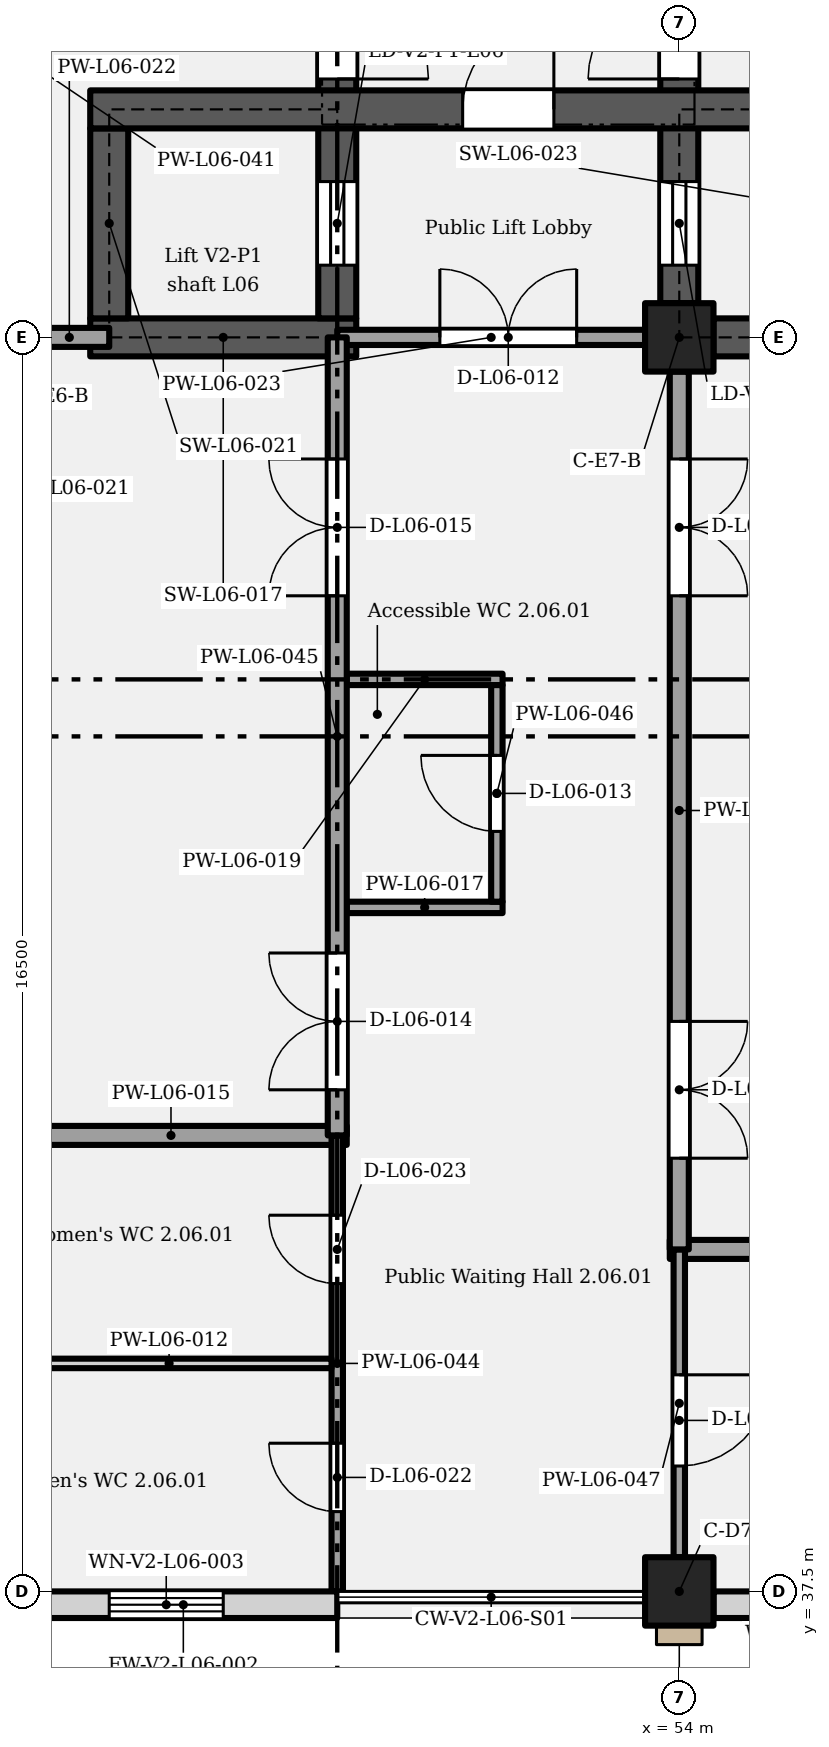
"""IFC4 building model, lengths in metres.
Left out: names, types, materials, properties, quantities, classifications, styles, units other than length and angle.
Written with IfcOpenShell. Run it as: python <this file> out.ifc"""

import sys

from ifc_helpers import new_model, si_unit, direction, frame, frame_2d, origin, origin_2d, place, context, subcontext, project, spatial, rectangle, extrude, element, fill, save


model = new_model("IFC4")
c1 = context("Model", 3, precision=1e-05, world=origin(), true_north=direction((0.0, 1.0)))
c2 = subcontext(c1, "Body", "Model", "MODEL_VIEW")
j1 = project(units=[si_unit("LENGTHUNIT", "METRE"), si_unit("PLANEANGLEUNIT", "RADIAN")], contexts=[c1])
p1 = place(None, origin())
s1 = spatial("IfcSite", under=j1, at=p1, CompositionType="ELEMENT")
p2 = place(p1, origin())
s2 = spatial("IfcBuilding", under=s1, at=p2, CompositionType="ELEMENT")
p3 = place(p2, frame((0.0, 0.0, 33.6)))
s3 = spatial("IfcBuildingStorey", under=s2, at=p3, CompositionType="ELEMENT", Elevation=33.6)
for number, where, z_axis, x_axis in (
    (1, (54.0, 37.5, 0.0), (0.0, 0.0, 1.0), (1.0, 0.0, 0.0)),
    (2, (54.0, 54.0, 0.0), (0.0, 0.0, 1.0), (1.0, 0.0, 0.0)),
):
    element("IfcColumn", number, at=place(p3, frame(where, z_axis=z_axis, x_axis=x_axis)), inside=s3, PredefinedType="COLUMN", context=c2, shape_type="SweptSolid", body=[
        extrude(rectangle(XDim=0.9, YDim=0.9, at=origin_2d()), origin(), (0.0, 0.0, 1.0), 5.4),
    ])
p4 = place(p3, frame((46.25, 54.0, 0.0), z_axis=(0.0, 0.0, 1.0), x_axis=(1.0, 0.0, 0.0)))
e3 = element("IfcWall", 3, at=p4, inside=s3, PredefinedType="SHEAR", context=c2, shape_type="SweptSolid", body=[
    extrude(rectangle(XDim=3.5, YDim=0.5, at=frame_2d((1.75, 0.0))), origin(), (0.0, 0.0, 1.0), 5.15),
])
p5 = place(p3, frame((54.45, 54.0, 0.0), z_axis=(0.0, 0.0, 1.0), x_axis=(1.0, 0.0, 0.0)))
e4 = element("IfcWall", 4, at=p5, inside=s3, PredefinedType="SHEAR", context=c2, shape_type="SweptSolid", body=[
    extrude(rectangle(XDim=2.8, YDim=0.5, at=frame_2d((1.4, 0.0))), origin(), (0.0, 0.0, 1.0), 5.15),
])
p6 = place(p3, frame((46.5, 54.25, 0.0), z_axis=(0.0, 0.0, 1.0), x_axis=(0.0, 1.0, 0.0)))
e5 = element("IfcWall", 5, at=p6, inside=s3, PredefinedType="SHEAR", context=c2, shape_type="SweptSolid", body=[
    extrude(rectangle(XDim=2.5, YDim=0.5, at=frame_2d((1.25, 0.0))), origin(), (0.0, 0.0, 1.0), 5.15),
])
p7 = place(p3, frame((49.5, 54.25, 0.0), z_axis=(0.0, 0.0, 1.0), x_axis=(0.0, 1.0, 0.0)))
e6 = element("IfcWall", 6, at=p7, inside=s3, PredefinedType="SHEAR", context=c2, shape_type="SweptSolid", body=[
    extrude(rectangle(XDim=11.5, YDim=0.5, at=frame_2d((5.75, 0.0))), origin(), (0.0, 0.0, 1.0), 5.15),
])
p8 = place(p7, frame((0.7, 0.0, 0.0)))
e7 = element("IfcOpeningElement", 7, at=p8, cuts=e6, PredefinedType="OPENING", context=c2, shape_type="SweptSolid", body=[
    extrude(rectangle(XDim=1.1, YDim=2.1, at=frame_2d((0.55, 1.05))), frame((0.0, 0.26, 0.0), z_axis=(0.0, -1.0, 0.0), x_axis=(1.0, 0.0, 0.0)), (0.0, 0.0, 1.0), 0.52),
])
p9 = place(p7, frame((4.35, 0.0, 0.0), z_axis=(0.0, 0.0, 1.0), x_axis=(-1.0, 0.0, 0.0)))
e8 = element("IfcOpeningElement", 8, at=p9, cuts=e6, PredefinedType="OPENING", context=c2, shape_type="SweptSolid", body=[
    extrude(rectangle(XDim=1.2, YDim=2.1, at=frame_2d((0.6, 1.05))), frame((0.0, 0.26, 0.0), z_axis=(0.0, -1.0, 0.0), x_axis=(1.0, 0.0, 0.0)), (0.0, 0.0, 1.0), 0.52),
])
p10 = place(p3, frame((54.0, 54.45, 0.0), z_axis=(0.0, 0.0, 1.0), x_axis=(0.0, 1.0, 0.0)))
e9 = element("IfcWall", 9, at=p10, inside=s3, PredefinedType="SHEAR", context=c2, shape_type="SweptSolid", body=[
    extrude(rectangle(XDim=11.1, YDim=0.5, at=frame_2d((5.55, 0.0))), origin(), (0.0, 0.0, 1.0), 5.15),
])
p11 = place(p10, frame((0.5, 0.0, 0.0)))
e10 = element("IfcOpeningElement", 10, at=p11, cuts=e9, PredefinedType="OPENING", context=c2, shape_type="SweptSolid", body=[
    extrude(rectangle(XDim=1.1, YDim=2.1, at=frame_2d((0.55, 1.05))), frame((0.0, 0.26, 0.0), z_axis=(0.0, -1.0, 0.0), x_axis=(1.0, 0.0, 0.0)), (0.0, 0.0, 1.0), 0.52),
])
p12 = place(p10, frame((2.95, 0.0, 0.0)))
e11 = element("IfcOpeningElement", 11, at=p12, cuts=e9, PredefinedType="OPENING", context=c2, shape_type="SweptSolid", body=[
    extrude(rectangle(XDim=1.2, YDim=2.1, at=frame_2d((0.6, 1.05))), frame((0.0, 0.26, 0.0), z_axis=(0.0, -1.0, 0.0), x_axis=(1.0, 0.0, 0.0)), (0.0, 0.0, 1.0), 0.52),
])
p13 = place(p3, frame((46.25, 57.0, 0.0), z_axis=(0.0, 0.0, 1.0), x_axis=(1.0, 0.0, 0.0)))
e12 = element("IfcWall", 12, at=p13, inside=s3, PredefinedType="SHEAR", context=c2, shape_type="SweptSolid", body=[
    extrude(rectangle(XDim=11.0, YDim=0.5, at=frame_2d((5.5, 0.0))), origin(), (0.0, 0.0, 1.0), 5.15),
])
p14 = place(p13, frame((4.9, 0.0, 0.0)))
e13 = element("IfcOpeningElement", 13, at=p14, cuts=e12, PredefinedType="OPENING", context=c2, shape_type="SweptSolid", body=[
    extrude(rectangle(XDim=1.2, YDim=2.1, at=frame_2d((0.6, 1.05))), frame((0.0, 0.26, 0.0), z_axis=(0.0, -1.0, 0.0), x_axis=(1.0, 0.0, 0.0)), (0.0, 0.0, 1.0), 0.52),
])
p15 = place(p3, frame((45.45, 37.325, 0.0), z_axis=(0.0, 0.0, 1.0), x_axis=(1.0, 0.0, 0.0)))
e14 = element("IfcWall", 14, at=p15, inside=s3, PredefinedType="SOLIDWALL", context=c2, shape_type="SweptSolid", body=[
    extrude(rectangle(XDim=4.05, YDim=0.35, at=frame_2d((2.025, 0.0))), origin(), (0.0, 0.0, 1.0), 5.15),
])
p16 = place(p15, frame((1.05, 0.0, 1.05)))
e15 = element("IfcOpeningElement", 15, at=p16, cuts=e14, PredefinedType="OPENING", context=c2, shape_type="SweptSolid", body=[
    extrude(rectangle(XDim=1.5, YDim=3.5, at=frame_2d((0.75, 1.75))), frame((0.0, 0.185, 0.0), z_axis=(0.0, -1.0, 0.0), x_axis=(1.0, 0.0, 0.0)), (0.0, 0.0, 1.0), 0.37),
])
p17 = place(p3, frame((54.45, 37.325, 0.0), z_axis=(0.0, 0.0, 1.0), x_axis=(1.0, 0.0, 0.0)))
e16 = element("IfcWall", 16, at=p17, inside=s3, PredefinedType="SOLIDWALL", context=c2, shape_type="SweptSolid", body=[
    extrude(rectangle(XDim=8.1, YDim=0.35, at=frame_2d((4.05, 0.0))), origin(), (0.0, 0.0, 1.0), 5.15),
])
p18 = place(p17, frame((0.525, 0.0, 1.05)))
e17 = element("IfcOpeningElement", 17, at=p18, cuts=e16, PredefinedType="OPENING", context=c2, shape_type="SweptSolid", body=[
    extrude(rectangle(XDim=1.05, YDim=2.4, at=frame_2d((0.525, 1.2))), frame((0.0, 0.185, 0.0), z_axis=(0.0, -1.0, 0.0), x_axis=(1.0, 0.0, 0.0)), (0.0, 0.0, 1.0), 0.37),
])
p19 = place(p17, frame((3.525, 0.0, 1.05)))
e18 = element("IfcOpeningElement", 18, at=p19, cuts=e16, PredefinedType="OPENING", context=c2, shape_type="SweptSolid", body=[
    extrude(rectangle(XDim=1.05, YDim=2.4, at=frame_2d((0.525, 1.2))), frame((0.0, 0.185, 0.0), z_axis=(0.0, -1.0, 0.0), x_axis=(1.0, 0.0, 0.0)), (0.0, 0.0, 1.0), 0.37),
])
p20 = place(p17, frame((6.525, 0.0, 1.05)))
e19 = element("IfcOpeningElement", 19, at=p20, cuts=e16, PredefinedType="OPENING", context=c2, shape_type="SweptSolid", body=[
    extrude(rectangle(XDim=1.05, YDim=2.4, at=frame_2d((0.525, 1.2))), frame((0.0, 0.185, 0.0), z_axis=(0.0, -1.0, 0.0), x_axis=(1.0, 0.0, 0.0)), (0.0, 0.0, 1.0), 0.37),
])
p21 = place(p3, frame((45.15, 40.5, 0.0), z_axis=(0.0, 0.0, 1.0), x_axis=(1.0, 0.0, 0.0)))
e20 = element("IfcWall", 20, at=p21, inside=s3, PredefinedType="PARTITIONING", context=c2, shape_type="SweptSolid", body=[
    extrude(rectangle(XDim=4.275, YDim=0.125, at=frame_2d((2.138, 0.0))), origin(), (0.0, 0.0, 1.0), 5.15),
])
p22 = place(p3, frame((53.875, 42.0, 0.0), z_axis=(0.0, 0.0, 1.0), x_axis=(1.0, 0.0, 0.0)))
e21 = element("IfcWall", 21, at=p22, inside=s3, PredefinedType="PARTITIONING", context=c2, shape_type="SweptSolid", body=[
    extrude(rectangle(XDim=9.125, YDim=0.25, at=frame_2d((4.562, 0.0))), origin(), (0.0, 0.0, 1.0), 5.15),
])
p23 = place(p3, frame((45.0, 43.5, 0.0), z_axis=(0.0, 0.0, 1.0), x_axis=(1.0, 0.0, 0.0)))
e22 = element("IfcWall", 22, at=p23, inside=s3, PredefinedType="PARTITIONING", context=c2, shape_type="SweptSolid", body=[
    extrude(rectangle(XDim=4.625, YDim=0.25, at=frame_2d((2.312, 0.0))), origin(), (0.0, 0.0, 1.0), 5.15),
])
for number, where, z_axis, x_axis in (
    (23, (49.625, 46.5, 0.0), (0.0, 0.0, 1.0), (1.0, 0.0, 0.0)),
    (24, (49.625, 49.5, 0.0), (0.0, 0.0, 1.0), (1.0, 0.0, 0.0)),
):
    element("IfcWall", number, at=place(p3, frame(where, z_axis=z_axis, x_axis=x_axis)), inside=s3, PredefinedType="PARTITIONING", context=c2, shape_type="SweptSolid", body=[
        extrude(rectangle(XDim=2.05, YDim=0.15, at=frame_2d((1.025, 0.0))), origin(), (0.0, 0.0, 1.0), 5.15),
    ])
p24 = place(p3, frame((45.45, 54.0, 0.0), z_axis=(0.0, 0.0, 1.0), x_axis=(1.0, 0.0, 0.0)))
e25 = element("IfcWall", 25, at=p24, inside=s3, PredefinedType="PARTITIONING", context=c2, shape_type="SweptSolid", body=[
    extrude(rectangle(XDim=1.05, YDim=0.25, at=frame_2d((0.525, 0.0))), origin(), (0.0, 0.0, 1.0), 4.4),
])
p25 = place(p3, frame((49.5, 54.0, 0.0), z_axis=(0.0, 0.0, 1.0), x_axis=(1.0, 0.0, 0.0)))
e26 = element("IfcWall", 26, at=p25, inside=s3, PredefinedType="PARTITIONING", context=c2, shape_type="SweptSolid", body=[
    extrude(rectangle(XDim=4.05, YDim=0.2, at=frame_2d((2.025, 0.0))), origin(), (0.0, 0.0, 1.0), 4.4),
])
p26 = place(p25, frame((1.35, 0.0, 0.0)))
e27 = element("IfcOpeningElement", 27, at=p26, cuts=e26, PredefinedType="OPENING", context=c2, shape_type="SweptSolid", body=[
    extrude(rectangle(XDim=1.8, YDim=2.1, at=frame_2d((0.9, 1.05))), frame((0.0, 0.11, 0.0), z_axis=(0.0, -1.0, 0.0), x_axis=(1.0, 0.0, 0.0)), (0.0, 0.0, 1.0), 0.22),
])
p27 = place(p3, frame((49.5, 37.5, 0.0), z_axis=(0.0, 0.0, 1.0), x_axis=(0.0, 1.0, 0.0)))
e28 = element("IfcWall", 28, at=p27, inside=s3, PredefinedType="PARTITIONING", context=c2, shape_type="SweptSolid", body=[
    extrude(rectangle(XDim=6.0, YDim=0.15, at=frame_2d((3.0, 0.0))), origin(), (0.0, 0.0, 1.0), 5.15),
])
p28 = place(p27, frame((1.05, 0.0, 0.0)))
e29 = element("IfcOpeningElement", 29, at=p28, cuts=e28, PredefinedType="OPENING", context=c2, shape_type="SweptSolid", body=[
    extrude(rectangle(XDim=0.9, YDim=2.1, at=frame_2d((0.45, 1.05))), frame((0.0, 0.085, 0.0), z_axis=(0.0, -1.0, 0.0), x_axis=(1.0, 0.0, 0.0)), (0.0, 0.0, 1.0), 0.17),
])
p29 = place(p27, frame((4.05, 0.0, 0.0)))
e30 = element("IfcOpeningElement", 30, at=p29, cuts=e28, PredefinedType="OPENING", context=c2, shape_type="SweptSolid", body=[
    extrude(rectangle(XDim=0.9, YDim=2.1, at=frame_2d((0.45, 1.05))), frame((0.0, 0.085, 0.0), z_axis=(0.0, -1.0, 0.0), x_axis=(1.0, 0.0, 0.0)), (0.0, 0.0, 1.0), 0.17),
])
p30 = place(p3, frame((49.5, 43.5, 0.0), z_axis=(0.0, 0.0, 1.0), x_axis=(0.0, 1.0, 0.0)))
e31 = element("IfcWall", 31, at=p30, inside=s3, PredefinedType="PARTITIONING", context=c2, shape_type="SweptSolid", body=[
    extrude(rectangle(XDim=10.5, YDim=0.25, at=frame_2d((5.25, 0.0))), origin(), (0.0, 0.0, 1.0), 5.15),
])
p31 = place(p30, frame((0.6, 0.0, 0.0)))
e32 = element("IfcOpeningElement", 32, at=p31, cuts=e31, PredefinedType="OPENING", context=c2, shape_type="SweptSolid", body=[
    extrude(rectangle(XDim=1.8, YDim=2.4, at=frame_2d((0.9, 1.2))), frame((0.0, 0.135, 0.0), z_axis=(0.0, -1.0, 0.0), x_axis=(1.0, 0.0, 0.0)), (0.0, 0.0, 1.0), 0.27),
])
p32 = place(p30, frame((7.1, 0.0, 0.0)))
e33 = element("IfcOpeningElement", 33, at=p32, cuts=e31, PredefinedType="OPENING", context=c2, shape_type="SweptSolid", body=[
    extrude(rectangle(XDim=1.8, YDim=2.4, at=frame_2d((0.9, 1.2))), frame((0.0, 0.135, 0.0), z_axis=(0.0, -1.0, 0.0), x_axis=(1.0, 0.0, 0.0)), (0.0, 0.0, 1.0), 0.27),
])
p33 = place(p3, frame((51.6, 46.575, 0.0), z_axis=(0.0, 0.0, 1.0), x_axis=(0.0, 1.0, 0.0)))
e34 = element("IfcWall", 34, at=p33, inside=s3, PredefinedType="PARTITIONING", context=c2, shape_type="SweptSolid", body=[
    extrude(rectangle(XDim=2.85, YDim=0.15, at=frame_2d((1.425, 0.0))), origin(), (0.0, 0.0, 1.0), 5.15),
])
p34 = place(p33, frame((0.925, 0.0, 0.0)))
e35 = element("IfcOpeningElement", 35, at=p34, cuts=e34, PredefinedType="OPENING", context=c2, shape_type="SweptSolid", body=[
    extrude(rectangle(XDim=1.0, YDim=2.1, at=frame_2d((0.5, 1.05))), frame((0.0, 0.085, 0.0), z_axis=(0.0, -1.0, 0.0), x_axis=(1.0, 0.0, 0.0)), (0.0, 0.0, 1.0), 0.17),
])
p35 = place(p3, frame((54.0, 37.95, 0.0), z_axis=(0.0, 0.0, 1.0), x_axis=(0.0, 1.0, 0.0)))
e36 = element("IfcWall", 36, at=p35, inside=s3, PredefinedType="PARTITIONING", context=c2, shape_type="SweptSolid", body=[
    extrude(rectangle(XDim=4.05, YDim=0.15, at=frame_2d((2.025, 0.0))), origin(), (0.0, 0.0, 1.0), 4.2),
])
p36 = place(p35, frame((2.4, 0.0, 0.0), z_axis=(0.0, 0.0, 1.0), x_axis=(-1.0, 0.0, 0.0)))
e37 = element("IfcOpeningElement", 37, at=p36, cuts=e36, PredefinedType="OPENING", context=c2, shape_type="SweptSolid", body=[
    extrude(rectangle(XDim=1.2, YDim=2.1, at=frame_2d((0.6, 1.05))), frame((0.0, 0.085, 0.0), z_axis=(0.0, -1.0, 0.0), x_axis=(1.0, 0.0, 0.0)), (0.0, 0.0, 1.0), 0.17),
])
p37 = place(p3, frame((54.0, 42.0, 0.0), z_axis=(0.0, 0.0, 1.0), x_axis=(0.0, 1.0, 0.0)))
e38 = element("IfcWall", 38, at=p37, inside=s3, PredefinedType="PARTITIONING", context=c2, shape_type="SweptSolid", body=[
    extrude(rectangle(XDim=11.55, YDim=0.25, at=frame_2d((5.775, 0.0))), origin(), (0.0, 0.0, 1.0), 4.2),
])
p38 = place(p37, frame((3.0, 0.0, 0.0), z_axis=(0.0, 0.0, 1.0), x_axis=(-1.0, 0.0, 0.0)))
e39 = element("IfcOpeningElement", 39, at=p38, cuts=e38, PredefinedType="OPENING", context=c2, shape_type="SweptSolid", body=[
    extrude(rectangle(XDim=1.8, YDim=2.4, at=frame_2d((0.9, 1.2))), frame((0.0, 0.135, 0.0), z_axis=(0.0, -1.0, 0.0), x_axis=(1.0, 0.0, 0.0)), (0.0, 0.0, 1.0), 0.27),
])
p39 = place(p37, frame((10.4, 0.0, 0.0), z_axis=(0.0, 0.0, 1.0), x_axis=(-1.0, 0.0, 0.0)))
e40 = element("IfcOpeningElement", 40, at=p39, cuts=e38, PredefinedType="OPENING", context=c2, shape_type="SweptSolid", body=[
    extrude(rectangle(XDim=1.8, YDim=2.4, at=frame_2d((0.9, 1.2))), frame((0.0, 0.135, 0.0), z_axis=(0.0, -1.0, 0.0), x_axis=(1.0, 0.0, 0.0)), (0.0, 0.0, 1.0), 0.27),
])
p40 = place(p16, origin())
e41 = element("IfcWindow", 41, at=p40, inside=s3, PartitioningType="SINGLE_PANEL", PredefinedType="WINDOW", context=c2, shape_type="SweptSolid", body=[
    extrude(rectangle(XDim=1.5, YDim=3.5, at=frame_2d((0.75, 1.75))), frame((0.0, 0.03, 0.0), z_axis=(0.0, -1.0, 0.0), x_axis=(1.0, 0.0, 0.0)), (0.0, 0.0, 1.0), 0.06),
])
fill(e15, e41)
p41 = place(p8, origin())
e42 = element("IfcDoor", 42, at=p41, inside=s3, OperationType="SLIDING_TO_LEFT", PredefinedType="DOOR", context=c2, shape_type="SweptSolid", body=[
    extrude(rectangle(XDim=1.1, YDim=2.1, at=frame_2d((0.55, 1.05))), frame((0.0, 0.025, 0.0), z_axis=(0.0, -1.0, 0.0), x_axis=(1.0, 0.0, 0.0)), (0.0, 0.0, 1.0), 0.05),
])
fill(e7, e42)
p42 = place(p11, origin())
e43 = element("IfcDoor", 43, at=p42, inside=s3, OperationType="SLIDING_TO_LEFT", PredefinedType="DOOR", context=c2, shape_type="SweptSolid", body=[
    extrude(rectangle(XDim=1.1, YDim=2.1, at=frame_2d((0.55, 1.05))), frame((0.0, 0.025, 0.0), z_axis=(0.0, -1.0, 0.0), x_axis=(1.0, 0.0, 0.0)), (0.0, 0.0, 1.0), 0.05),
])
fill(e10, e43)
p43 = place(p14, origin())
e44 = element("IfcDoor", 44, at=p43, inside=s3, OperationType="SINGLE_SWING_RIGHT", PredefinedType="DOOR", context=c2, shape_type="SweptSolid", body=[
    extrude(rectangle(XDim=1.2, YDim=2.1, at=frame_2d((0.6, 1.05))), frame((0.0, 0.025, 0.0), z_axis=(0.0, -1.0, 0.0), x_axis=(1.0, 0.0, 0.0)), (0.0, 0.0, 1.0), 0.05),
])
fill(e13, e44)
p44 = place(p12, origin())
e45 = element("IfcDoor", 45, at=p44, inside=s3, OperationType="SINGLE_SWING_LEFT", PredefinedType="DOOR", context=c2, shape_type="SweptSolid", body=[
    extrude(rectangle(XDim=1.2, YDim=2.1, at=frame_2d((0.6, 1.05))), frame((0.0, 0.025, 0.0), z_axis=(0.0, -1.0, 0.0), x_axis=(1.0, 0.0, 0.0)), (0.0, 0.0, 1.0), 0.05),
])
fill(e11, e45)
p45 = place(p9, origin())
e46 = element("IfcDoor", 46, at=p45, inside=s3, OperationType="SINGLE_SWING_RIGHT", PredefinedType="DOOR", context=c2, shape_type="SweptSolid", body=[
    extrude(rectangle(XDim=1.2, YDim=2.1, at=frame_2d((0.6, 1.05))), frame((0.0, 0.025, 0.0), z_axis=(0.0, -1.0, 0.0), x_axis=(1.0, 0.0, 0.0)), (0.0, 0.0, 1.0), 0.05),
])
fill(e8, e46)
p46 = place(p26, origin())
e47 = element("IfcDoor", 47, at=p46, inside=s3, OperationType="DOUBLE_DOOR_SINGLE_SWING", PredefinedType="DOOR", context=c2, shape_type="SweptSolid", body=[
    extrude(rectangle(XDim=1.8, YDim=2.1, at=frame_2d((0.9, 1.05))), frame((0.0, 0.025, 0.0), z_axis=(0.0, -1.0, 0.0), x_axis=(1.0, 0.0, 0.0)), (0.0, 0.0, 1.0), 0.05),
])
fill(e27, e47)
p47 = place(p34, origin())
e48 = element("IfcDoor", 48, at=p47, inside=s3, OperationType="SINGLE_SWING_RIGHT", PredefinedType="DOOR", context=c2, shape_type="SweptSolid", body=[
    extrude(rectangle(XDim=1.0, YDim=2.1, at=frame_2d((0.5, 1.05))), frame((0.0, 0.025, 0.0), z_axis=(0.0, -1.0, 0.0), x_axis=(1.0, 0.0, 0.0)), (0.0, 0.0, 1.0), 0.05),
])
fill(e35, e48)
p48 = place(p31, origin())
e49 = element("IfcDoor", 49, at=p48, inside=s3, OperationType="DOUBLE_DOOR_SINGLE_SWING", PredefinedType="DOOR", context=c2, shape_type="SweptSolid", body=[
    extrude(rectangle(XDim=1.8, YDim=2.4, at=frame_2d((0.9, 1.2))), frame((0.0, 0.025, 0.0), z_axis=(0.0, -1.0, 0.0), x_axis=(1.0, 0.0, 0.0)), (0.0, 0.0, 1.0), 0.05),
])
fill(e32, e49)
p49 = place(p32, origin())
e50 = element("IfcDoor", 50, at=p49, inside=s3, OperationType="DOUBLE_DOOR_SINGLE_SWING", PredefinedType="DOOR", context=c2, shape_type="SweptSolid", body=[
    extrude(rectangle(XDim=1.8, YDim=2.4, at=frame_2d((0.9, 1.2))), frame((0.0, 0.025, 0.0), z_axis=(0.0, -1.0, 0.0), x_axis=(1.0, 0.0, 0.0)), (0.0, 0.0, 1.0), 0.05),
])
fill(e33, e50)
p50 = place(p28, origin())
e51 = element("IfcDoor", 51, at=p50, inside=s3, OperationType="SINGLE_SWING_RIGHT", PredefinedType="DOOR", context=c2, shape_type="SweptSolid", body=[
    extrude(rectangle(XDim=0.9, YDim=2.1, at=frame_2d((0.45, 1.05))), frame((0.0, 0.025, 0.0), z_axis=(0.0, -1.0, 0.0), x_axis=(1.0, 0.0, 0.0)), (0.0, 0.0, 1.0), 0.05),
])
fill(e29, e51)
p51 = place(p29, origin())
e52 = element("IfcDoor", 52, at=p51, inside=s3, OperationType="SINGLE_SWING_RIGHT", PredefinedType="DOOR", context=c2, shape_type="SweptSolid", body=[
    extrude(rectangle(XDim=0.9, YDim=2.1, at=frame_2d((0.45, 1.05))), frame((0.0, 0.025, 0.0), z_axis=(0.0, -1.0, 0.0), x_axis=(1.0, 0.0, 0.0)), (0.0, 0.0, 1.0), 0.05),
])
fill(e30, e52)
p52 = place(p36, origin())
e53 = element("IfcDoor", 53, at=p52, inside=s3, OperationType="SINGLE_SWING_LEFT", PredefinedType="DOOR", context=c2, shape_type="SweptSolid", body=[
    extrude(rectangle(XDim=1.2, YDim=2.1, at=frame_2d((0.6, 1.05))), frame((0.0, 0.025, 0.0), z_axis=(0.0, -1.0, 0.0), x_axis=(1.0, 0.0, 0.0)), (0.0, 0.0, 1.0), 0.05),
])
fill(e37, e53)
p53 = place(p38, origin())
e54 = element("IfcDoor", 54, at=p53, inside=s3, OperationType="DOUBLE_DOOR_SINGLE_SWING", PredefinedType="DOOR", context=c2, shape_type="SweptSolid", body=[
    extrude(rectangle(XDim=1.8, YDim=2.4, at=frame_2d((0.9, 1.2))), frame((0.0, 0.025, 0.0), z_axis=(0.0, -1.0, 0.0), x_axis=(1.0, 0.0, 0.0)), (0.0, 0.0, 1.0), 0.05),
])
fill(e39, e54)
p54 = place(p39, origin())
e55 = element("IfcDoor", 55, at=p54, inside=s3, OperationType="DOUBLE_DOOR_SINGLE_SWING", PredefinedType="DOOR", context=c2, shape_type="SweptSolid", body=[
    extrude(rectangle(XDim=1.8, YDim=2.4, at=frame_2d((0.9, 1.2))), frame((0.0, 0.025, 0.0), z_axis=(0.0, -1.0, 0.0), x_axis=(1.0, 0.0, 0.0)), (0.0, 0.0, 1.0), 0.05),
])
fill(e40, e55)
save(model, sys.argv[1])
